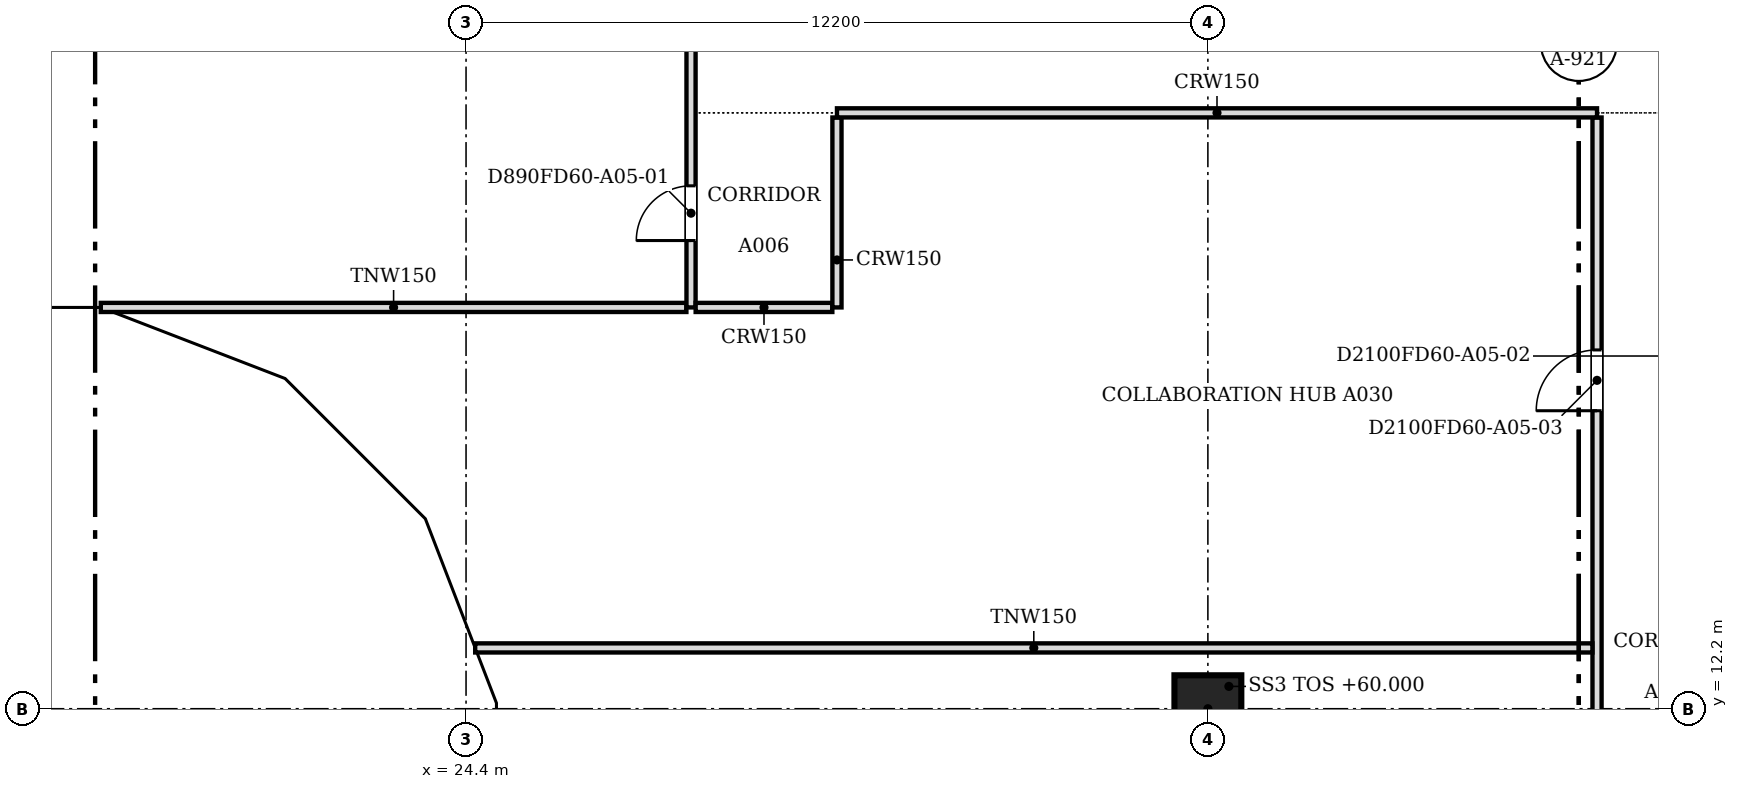
"""IFC4 building model, lengths in metres.
Left out: names, types, materials, properties, quantities, classifications, styles, units other than length and angle.
Written with IfcOpenShell. Run it as: python <this file> out.ifc"""

import sys

from ifc_helpers import new_model, si_unit, direction, frame, frame_2d, origin, origin_2d, place, context, subcontext, project, spatial, polyline, rectangle, outline, extrude, faceted_brep, source, transform, mapped, element, fill, save


model = new_model("IFC4")
c1 = context("Model", 3, precision=1e-05, world=origin(), true_north=direction((0.0, 1.0)))
c2 = subcontext(c1, "Body", "Model", "MODEL_VIEW")
j1 = project(units=[si_unit("LENGTHUNIT", "METRE"), si_unit("PLANEANGLEUNIT", "RADIAN")], contexts=[c1])
p1 = place(None, origin())
s1 = spatial("IfcSite", under=j1, at=p1, CompositionType="ELEMENT")
p2 = place(p1, origin())
s2 = spatial("IfcBuilding", under=s1, at=p2, CompositionType="ELEMENT")
p3 = place(p2, frame((0.0, 0.0, 60.0)))
s3 = spatial("IfcBuildingStorey", under=s2, at=p3, CompositionType="ELEMENT", Elevation=60.0)
p4 = place(p3, frame((36.6, 12.2, 0.0), z_axis=(0.0, 0.0, 1.0), x_axis=(1.0, 0.0, 0.0)))
e1 = element("IfcColumn", 1, at=p4, inside=s3, PredefinedType="COLUMN", context=c2, shape_type="SweptSolid", body=[
    extrude(rectangle(XDim=1.1, YDim=1.1, at=origin_2d()), origin(), (0.0, 0.0, 1.0), 3.5),
])
m1 = source(origin(), c2, "Body", "Brep", [
    faceted_brep([(3.05, -0.25, 0.0), (6.1, -0.25, 3.743), (6.1, -0.25, 3.857), (3.05, -0.25, 7.6), (0.0, -0.25, 3.8), (0.0, 0.25, 3.8), (3.05, 0.25, 7.6), (6.146, 0.25, 3.8), (3.05, 0.25, 0.0), (6.146, -0.0, 3.8)], [[[0, 1, 2, 3, 4]], [[5, 6, 7, 8]], [[8, 7, 9, 1, 0]], [[7, 6, 3, 2, 9]], [[6, 5, 4, 3]], [[5, 8, 0, 4]], [[1, 9, 2]]]),
])
p5 = place(p3, frame((12.2, 18.55, -3.8), z_axis=(0.0, 0.0, 1.0), x_axis=(1.0, 0.0, 0.0)))
e2 = element("IfcWall", 2, at=p5, inside=s3, PredefinedType="SOLIDWALL", context=c2, shape_type="MappedRepresentation", body=[
    mapped(m1, transform((0.0, 0.0, 0.0), scale=1.0)),
])
m2 = source(origin(), c2, "Body", "SweptSolid", [
    extrude(outline(polyline([(3.052, 0.398), (5.824, 3.8), (3.052, 7.202), (0.321, 3.8), (3.052, 0.398)])), frame((0.0, 0.26, 0.0), z_axis=(0.0, -1.0, 0.0), x_axis=(1.0, 0.0, 0.0)), (0.0, 0.0, 1.0), 0.52),
])
p6 = place(p5, origin())
e3 = element("IfcOpeningElement", 3, at=p6, cuts=e2, PredefinedType="OPENING", context=c2, shape_type="MappedRepresentation", body=[
    mapped(m2, transform((0.0, 0.0, 0.0), scale=1.0)),
])
m3 = source(origin(), c2, "Body", "Brep", [
    faceted_brep([(3.096, -0.25, 7.536), (0.047, -0.25, 3.856), (0.047, -0.25, 3.744), (3.096, -0.25, 0.064), (0.0, 0.25, 3.8), (3.149, 0.25, 7.6), (3.202, 0.25, 7.536), (3.202, 0.25, 0.064), (3.149, 0.25, 0.0), (3.149, -0.0, 0.0), (3.149, -0.0, 7.6), (0.0, 0.0, 3.8)], [[[0, 1, 2, 3]], [[4, 5, 6, 7, 8]], [[8, 7, 9]], [[6, 5, 10]], [[5, 4, 11, 1, 0, 10]], [[4, 8, 9, 3, 2, 11]], [[11, 2, 1]], [[3, 9, 7, 6, 10, 0]]]),
])
p7 = place(p3, frame((18.346, 18.55, -3.8), z_axis=(0.0, 0.0, 1.0), x_axis=(0.932985567668, -0.359913782069, 0.0)))
e4 = element("IfcWall", 4, at=p7, inside=s3, PredefinedType="SOLIDWALL", context=c2, shape_type="MappedRepresentation", body=[
    mapped(m3, transform((0.0, 0.0, 0.0), scale=1.0)),
])
m4 = source(origin(), c2, "Body", "SweptSolid", [
    extrude(outline(polyline([(2.949, 6.967), (0.325, 3.8), (2.949, 0.633), (2.949, 6.967)])), frame((0.0, 0.26, 0.0), z_axis=(0.0, -1.0, 0.0), x_axis=(1.0, 0.0, 0.0)), (0.0, 0.0, 1.0), 0.52),
])
p8 = place(p7, origin())
e5 = element("IfcOpeningElement", 5, at=p8, cuts=e4, PredefinedType="OPENING", context=c2, shape_type="MappedRepresentation", body=[
    mapped(m4, transform((0.0, 0.0, 0.0), scale=1.0)),
])
m5 = source(origin(), c2, "Body", "Brep", [
    faceted_brep([(0.106, -0.25, 0.064), (3.156, -0.25, 3.736), (3.156, -0.25, 3.864), (0.106, -0.25, 7.536), (0.0, 0.25, 7.536), (0.053, 0.25, 7.6), (3.209, 0.25, 3.8), (0.053, 0.25, 0.0), (0.0, 0.25, 0.064), (3.209, -0.0, 3.8), (0.053, 0.0, 0.0), (0.053, 0.0, 7.6)], [[[0, 1, 2, 3]], [[4, 5, 6, 7, 8]], [[7, 6, 9, 1, 0, 10]], [[6, 5, 11, 3, 2, 9]], [[5, 4, 11]], [[8, 7, 10]], [[8, 10, 0, 3, 11, 4]], [[1, 9, 2]]]),
])
p9 = place(p3, frame((21.248, 17.454, -3.8), z_axis=(0.0, 0.0, 1.0), x_axis=(0.707106781187, -0.707106781187, 0.0)))
e6 = element("IfcWall", 6, at=p9, inside=s3, PredefinedType="SOLIDWALL", context=c2, shape_type="MappedRepresentation", body=[
    mapped(m5, transform((0.0, 0.0, 0.0), scale=1.0)),
])
m6 = source(origin(), c2, "Body", "SweptSolid", [
    extrude(outline(polyline([(0.253, 0.632), (2.884, 3.8), (0.253, 6.968), (0.253, 0.632)])), frame((0.0, 0.26, 0.0), z_axis=(0.0, -1.0, 0.0), x_axis=(1.0, 0.0, 0.0)), (0.0, 0.0, 1.0), 0.52),
])
p10 = place(p9, origin())
e7 = element("IfcOpeningElement", 7, at=p10, cuts=e6, PredefinedType="OPENING", context=c2, shape_type="MappedRepresentation", body=[
    mapped(m6, transform((0.0, 0.0, 0.0), scale=1.0)),
])
m7 = source(origin(), c2, "Body", "Brep", [
    faceted_brep([(3.103, -0.25, 7.544), (0.053, -0.25, 3.864), (0.053, -0.25, 3.736), (3.103, -0.25, 0.056), (0.0, 0.25, 3.8), (3.149, 0.25, 7.6), (3.196, 0.25, 7.543), (3.196, 0.25, 0.057), (3.149, 0.25, 0.0), (3.149, -0.0, 0.0), (3.149, -0.0, 7.6), (0.0, 0.0, 3.8)], [[[0, 1, 2, 3]], [[4, 5, 6, 7, 8]], [[8, 7, 9]], [[6, 5, 10]], [[5, 4, 11, 1, 0, 10]], [[4, 8, 9, 3, 2, 11]], [[11, 2, 1]], [[3, 9, 7, 6, 10, 0]]]),
])
p11 = place(p3, frame((23.517, 15.185, -3.8), z_axis=(0.0, 0.0, 1.0), x_axis=(0.359864468756, -0.933004589553, 0.0)))
e8 = element("IfcWall", 8, at=p11, inside=s3, PredefinedType="SOLIDWALL", context=c2, shape_type="MappedRepresentation", body=[
    mapped(m7, transform((0.0, 0.0, 0.0), scale=1.0)),
])
p12 = place(p11, origin())
e9 = element("IfcOpeningElement", 9, at=p12, cuts=e8, PredefinedType="OPENING", context=c2, shape_type="MappedRepresentation", body=[
    mapped(m4, transform((0.0, 0.0, 0.0), scale=1.0)),
])
m8 = source(origin(), c2, "Body", "Brep", [
    faceted_brep([(0.093, -0.25, 0.057), (3.143, -0.25, 3.8), (0.093, -0.25, 7.543), (0.0, 0.25, 7.544), (0.047, 0.25, 7.6), (3.143, 0.25, 3.8), (0.047, 0.25, 0.0), (0.0, 0.25, 0.056), (0.047, 0.0, 0.0), (0.047, 0.0, 7.6)], [[[0, 1, 2]], [[3, 4, 5, 6, 7]], [[6, 5, 1, 0, 8]], [[5, 4, 9, 2, 1]], [[4, 3, 9]], [[7, 6, 8]], [[7, 8, 0, 2, 9, 3]]]),
])
p13 = place(p3, frame((24.65, 12.293, -3.8), z_axis=(0.0, 0.0, 1.0), x_axis=(0.0, -1.0, 0.0)))
e10 = element("IfcWall", 10, at=p13, inside=s3, PredefinedType="SOLIDWALL", context=c2, shape_type="MappedRepresentation", body=[
    mapped(m8, transform((0.0, 0.0, 0.0), scale=1.0)),
])
m9 = source(origin(), c2, "Body", "SweptSolid", [
    extrude(outline(polyline([(0.247, 0.641), (2.821, 3.8), (0.247, 6.959), (0.247, 0.641)])), frame((0.0, 0.26, 0.0), z_axis=(0.0, -1.0, 0.0), x_axis=(1.0, 0.0, 0.0)), (0.0, 0.0, 1.0), 0.52),
])
p14 = place(p13, origin())
e11 = element("IfcOpeningElement", 11, at=p14, cuts=e10, PredefinedType="OPENING", context=c2, shape_type="MappedRepresentation", body=[
    mapped(m9, transform((0.0, 0.0, 0.0), scale=1.0)),
])
m10 = source(origin(), c2, "Body", "Brep", [
    faceted_brep([(3.05, -0.25, 3.8), (0.0, -0.25, 3.8), (3.05, -0.25, 0.057), (0.0, 0.25, 3.8), (3.143, 0.25, 3.8), (3.143, 0.25, 0.056), (3.096, 0.25, 0.0), (3.096, -0.0, 0.0)], [[[0, 1, 2]], [[3, 4, 5, 6]], [[6, 5, 7]], [[4, 3, 1, 0]], [[3, 6, 7, 2, 1]], [[2, 7, 5, 4, 0]]]),
])
p15 = place(p3, frame((15.25, 18.55, 0.0), z_axis=(0.0, 0.0, 1.0), x_axis=(1.0, 0.0, 0.0)))
e12 = element("IfcWall", 12, at=p15, inside=s3, PredefinedType="SOLIDWALL", context=c2, shape_type="MappedRepresentation", body=[
    mapped(m10, transform((0.0, 0.0, 0.0), scale=1.0)),
])
m11 = source(origin(), c2, "Body", "SweptSolid", [
    extrude(outline(polyline([(2.896, 3.55), (0.526, 3.55), (2.896, 0.641), (2.896, 3.55)])), frame((0.0, 0.26, 0.0), z_axis=(0.0, -1.0, 0.0), x_axis=(1.0, 0.0, 0.0)), (0.0, 0.0, 1.0), 0.52),
])
p16 = place(p15, origin())
e13 = element("IfcOpeningElement", 13, at=p16, cuts=e12, PredefinedType="OPENING", context=c2, shape_type="MappedRepresentation", body=[
    mapped(m11, transform((0.0, 0.0, 0.0), scale=1.0)),
])
m12 = source(origin(), c2, "Body", "Brep", [
    faceted_brep([(0.093, -0.25, 0.056), (3.143, -0.25, 3.736), (3.143, -0.25, 3.8), (0.093, -0.25, 3.8), (0.0, 0.25, 3.8), (3.196, 0.25, 3.8), (0.047, 0.25, 0.0), (0.0, 0.25, 0.057), (3.196, -0.0, 3.8), (0.047, 0.0, 0.0)], [[[0, 1, 2, 3]], [[4, 5, 6, 7]], [[6, 5, 8, 1, 0, 9]], [[5, 4, 3, 2, 8]], [[7, 6, 9]], [[7, 9, 0, 3, 4]], [[1, 8, 2]]]),
])
p17 = place(p3, frame((18.303, 18.567, 0.0), z_axis=(0.0, 0.0, 1.0), x_axis=(0.932978940178, -0.359930961693, 0.0)))
e14 = element("IfcWall", 14, at=p17, inside=s3, PredefinedType="SOLIDWALL", context=c2, shape_type="MappedRepresentation", body=[
    mapped(m12, transform((0.0, 0.0, 0.0), scale=1.0)),
])
m13 = source(origin(), c2, "Body", "SweptSolid", [
    extrude(outline(polyline([(0.247, 0.633), (2.664, 3.55), (0.247, 3.55), (0.247, 0.633)])), frame((0.0, 0.26, 0.0), z_axis=(0.0, -1.0, 0.0), x_axis=(1.0, 0.0, 0.0)), (0.0, 0.0, 1.0), 0.52),
])
p18 = place(p17, origin())
e15 = element("IfcOpeningElement", 15, at=p18, cuts=e14, PredefinedType="OPENING", context=c2, shape_type="MappedRepresentation", body=[
    mapped(m13, transform((0.0, 0.0, 0.0), scale=1.0)),
])
m14 = source(origin(), c2, "Body", "Brep", [
    faceted_brep([(3.103, -0.25, 3.8), (0.053, -0.25, 3.8), (0.053, -0.25, 3.736), (3.103, -0.25, 0.064), (0.0, 0.25, 3.8), (3.209, 0.25, 3.8), (3.209, 0.25, 0.064), (3.156, 0.25, 0.0), (3.156, -0.0, 0.0), (0.0, 0.0, 3.8)], [[[0, 1, 2, 3]], [[4, 5, 6, 7]], [[7, 6, 8]], [[5, 4, 9, 1, 0]], [[4, 7, 8, 3, 2, 9]], [[2, 1, 9]], [[3, 8, 6, 5, 0]]]),
])
p19 = place(p3, frame((21.285, 17.417, 0.0), z_axis=(0.0, 0.0, 1.0), x_axis=(0.707106781187, -0.707106781187, 0.0)))
e16 = element("IfcWall", 16, at=p19, inside=s3, PredefinedType="SOLIDWALL", context=c2, shape_type="MappedRepresentation", body=[
    mapped(m14, transform((0.0, 0.0, 0.0), scale=1.0)),
])
m15 = source(origin(), c2, "Body", "SweptSolid", [
    extrude(outline(polyline([(2.956, 3.55), (0.533, 3.55), (2.956, 0.632), (2.956, 3.55)])), frame((0.0, 0.26, 0.0), z_axis=(0.0, -1.0, 0.0), x_axis=(1.0, 0.0, 0.0)), (0.0, 0.0, 1.0), 0.52),
])
p20 = place(p19, origin())
e17 = element("IfcOpeningElement", 17, at=p20, cuts=e16, PredefinedType="OPENING", context=c2, shape_type="MappedRepresentation", body=[
    mapped(m15, transform((0.0, 0.0, 0.0), scale=1.0)),
])
m16 = source(origin(), c2, "Body", "Brep", [
    faceted_brep([(0.106, -0.25, 0.064), (3.156, -0.25, 3.744), (3.156, -0.25, 3.8), (0.106, -0.25, 3.8), (0.0, 0.25, 3.8), (3.202, 0.25, 3.8), (0.053, 0.25, 0.0), (0.0, 0.25, 0.064), (3.202, -0.0, 3.8), (0.053, 0.0, 0.0)], [[[0, 1, 2, 3]], [[4, 5, 6, 7]], [[6, 5, 8, 1, 0, 9]], [[5, 4, 3, 2, 8]], [[7, 6, 9]], [[7, 9, 0, 3, 4]], [[1, 8, 2]]]),
])
p21 = place(p3, frame((23.497, 15.234, 0.0), z_axis=(0.0, 0.0, 1.0), x_axis=(0.359913782069, -0.932985567668, 0.0)))
e18 = element("IfcWall", 18, at=p21, inside=s3, PredefinedType="SOLIDWALL", context=c2, shape_type="MappedRepresentation", body=[
    mapped(m16, transform((0.0, 0.0, 0.0), scale=1.0)),
])
m17 = source(origin(), c2, "Body", "SweptSolid", [
    extrude(outline(polyline([(0.253, 0.633), (2.671, 3.55), (0.253, 3.55), (0.253, 0.633)])), frame((0.0, 0.26, 0.0), z_axis=(0.0, -1.0, 0.0), x_axis=(1.0, 0.0, 0.0)), (0.0, 0.0, 1.0), 0.52),
])
p22 = place(p21, origin())
e19 = element("IfcOpeningElement", 19, at=p22, cuts=e18, PredefinedType="OPENING", context=c2, shape_type="MappedRepresentation", body=[
    mapped(m17, transform((0.0, 0.0, 0.0), scale=1.0)),
])
m18 = source(origin(), c2, "Body", "Brep", [
    faceted_brep([(3.096, -0.25, 0.0), (6.1, -0.25, 3.8), (0.047, -0.25, 3.8), (0.047, -0.25, 3.743), (0.0, 0.25, 3.8), (6.053, 0.25, 3.8), (6.053, 0.25, 3.741), (3.096, 0.25, 0.0), (6.1, -0.0, 3.8), (0.0, 0.0, 3.8)], [[[0, 1, 2, 3]], [[4, 5, 6, 7]], [[7, 6, 8, 1, 0]], [[5, 4, 9, 2, 1, 8]], [[4, 7, 0, 3, 9]], [[3, 2, 9]], [[6, 5, 8]]]),
])
p23 = place(p3, frame((24.65, 12.247, 0.0), z_axis=(0.0, 0.0, 1.0), x_axis=(0.0, -1.0, 0.0)))
e20 = element("IfcWall", 20, at=p23, inside=s3, PredefinedType="SOLIDWALL", context=c2, shape_type="MappedRepresentation", body=[
    mapped(m18, transform((0.0, 0.0, 0.0), scale=1.0)),
])
m19 = source(origin(), c2, "Body", "SweptSolid", [
    extrude(outline(polyline([(3.094, 0.399), (5.584, 3.55), (0.526, 3.55), (3.094, 0.399)])), frame((0.0, 0.26, 0.0), z_axis=(0.0, -1.0, 0.0), x_axis=(1.0, 0.0, 0.0)), (0.0, 0.0, 1.0), 0.52),
])
p24 = place(p23, origin())
e21 = element("IfcOpeningElement", 21, at=p24, cuts=e20, PredefinedType="OPENING", context=c2, shape_type="MappedRepresentation", body=[
    mapped(m19, transform((0.0, 0.0, 0.0), scale=1.0)),
])
p25 = place(p3, frame((43.0, 0.5, 0.0), z_axis=(0.0, 0.0, 1.0), x_axis=(0.0, 1.0, 0.0)))
e22 = element("IfcWall", 22, at=p25, inside=s3, PredefinedType="PARTITIONING", context=c2, shape_type="SweptSolid", body=[
    extrude(rectangle(XDim=21.424, YDim=0.15, at=frame_2d((10.712, 0.0))), origin(), (0.0, 0.0, 1.0), 2.888),
])
m20 = source(origin(), c2, "Body", "SweptSolid", [
    extrude(rectangle(XDim=1.0, YDim=2.1, at=frame_2d((0.5, 1.05))), frame((0.0, 0.085, 0.0), z_axis=(0.0, -1.0, 0.0), x_axis=(1.0, 0.0, 0.0)), (0.0, 0.0, 1.0), 0.17),
])
p26 = place(p25, frame((16.601, 0.0, 0.0)))
e23 = element("IfcOpeningElement", 23, at=p26, cuts=e22, PredefinedType="OPENING", context=c2, shape_type="MappedRepresentation", body=[
    mapped(m20, transform((0.0, 0.0, 0.0), scale=1.0)),
])
p27 = place(p25, frame((7.7, 0.0, 0.0)))
e24 = element("IfcOpeningElement", 24, at=p27, cuts=e22, PredefinedType="OPENING", context=c2, shape_type="MappedRepresentation", body=[
    mapped(m20, transform((0.0, 0.0, 0.0), scale=1.0)),
])
p28 = place(p3, frame((24.55, 13.2, 0.0), z_axis=(0.0, 0.0, 1.0), x_axis=(1.0, 0.0, 0.0)))
e25 = element("IfcWall", 25, at=p28, inside=s3, PredefinedType="PARTITIONING", context=c2, shape_type="SweptSolid", body=[
    extrude(rectangle(XDim=18.374, YDim=0.15, at=frame_2d((9.187, 0.0))), origin(), (0.0, 0.0, 1.0), 2.888),
])
p29 = place(p3, frame((18.393, 18.8, 0.0), z_axis=(0.0, 0.0, 1.0), x_axis=(1.0, 0.0, 0.0)))
e26 = element("IfcWall", 26, at=p29, inside=s3, PredefinedType="PARTITIONING", context=c2, shape_type="SweptSolid", body=[
    extrude(rectangle(XDim=9.631, YDim=0.15, at=frame_2d((4.815, 0.0))), origin(), (0.0, 0.0, 1.0), 2.888),
])
p30 = place(p3, frame((28.1, 18.8, 0.0), z_axis=(0.0, 0.0, 1.0), x_axis=(0.0, 1.0, 0.0)))
e27 = element("IfcWall", 27, at=p30, inside=s3, PredefinedType="PARTITIONING", context=c2, shape_type="SweptSolid", body=[
    extrude(rectangle(XDim=26.5, YDim=0.15, at=frame_2d((13.25, 0.0))), origin(), (0.0, 0.0, 1.0), 2.888),
])
m21 = source(origin(), c2, "Body", "SweptSolid", [
    extrude(rectangle(XDim=0.9, YDim=2.1, at=frame_2d((0.45, 1.05))), frame((0.0, 0.085, 0.0), z_axis=(0.0, -1.0, 0.0), x_axis=(1.0, 0.0, 0.0)), (0.0, 0.0, 1.0), 0.17),
])
p31 = place(p30, frame((1.1, 0.0, 0.0)))
e28 = element("IfcOpeningElement", 28, at=p31, cuts=e27, PredefinedType="OPENING", context=c2, shape_type="MappedRepresentation", body=[
    mapped(m21, transform((0.0, 0.0, 0.0), scale=1.0)),
])
p32 = place(p30, frame((23.151, 0.0, 0.0)))
e29 = element("IfcOpeningElement", 29, at=p32, cuts=e27, PredefinedType="OPENING", context=c2, shape_type="MappedRepresentation", body=[
    mapped(m20, transform((0.0, 0.0, 0.0), scale=1.0)),
])
p33 = place(p30, frame((8.2, 0.0, 0.0)))
e30 = element("IfcOpeningElement", 30, at=p33, cuts=e27, PredefinedType="OPENING", context=c2, shape_type="MappedRepresentation", body=[
    mapped(m21, transform((0.0, 0.0, 0.0), scale=1.0)),
])
p34 = place(p30, frame((15.8, 0.0, 0.0)))
e31 = element("IfcOpeningElement", 31, at=p34, cuts=e27, PredefinedType="OPENING", context=c2, shape_type="MappedRepresentation", body=[
    mapped(m21, transform((0.0, 0.0, 0.0), scale=1.0)),
])
p35 = place(p3, frame((28.176, 18.8, 0.0), z_axis=(0.0, 0.0, 1.0), x_axis=(1.0, 0.0, 0.0)))
e32 = element("IfcWall", 32, at=p35, inside=s3, PredefinedType="PARTITIONING", context=c2, shape_type="SweptSolid", body=[
    extrude(rectangle(XDim=2.248, YDim=0.15, at=frame_2d((1.124, 0.0))), origin(), (0.0, 0.0, 1.0), 2.888),
])
p36 = place(p3, frame((30.5, 18.8, 0.0), z_axis=(0.0, 0.0, 1.0), x_axis=(0.0, 1.0, 0.0)))
e33 = element("IfcWall", 33, at=p36, inside=s3, PredefinedType="PARTITIONING", context=c2, shape_type="SweptSolid", body=[
    extrude(rectangle(XDim=3.124, YDim=0.15, at=frame_2d((1.562, 0.0))), origin(), (0.0, 0.0, 1.0), 2.888),
])
p37 = place(p3, frame((30.5, 22.0, 0.0), z_axis=(0.0, 0.0, 1.0), x_axis=(1.0, 0.0, 0.0)))
e34 = element("IfcWall", 34, at=p37, inside=s3, PredefinedType="PARTITIONING", context=c2, shape_type="SweptSolid", body=[
    extrude(rectangle(XDim=12.5, YDim=0.15, at=frame_2d((6.25, 0.0))), origin(), (0.0, 0.0, 1.0), 2.888),
])
m22 = source(origin(), c2, "Body", "SweptSolid", [
    extrude(rectangle(XDim=0.9, YDim=2.1, at=frame_2d((0.45, 1.05))), frame((0.0, 0.025, 0.0), z_axis=(0.0, -1.0, 0.0), x_axis=(1.0, 0.0, 0.0)), (0.0, 0.0, 1.0), 0.05),
])
p38 = place(p31, origin())
e35 = element("IfcDoor", 35, at=p38, inside=s3, OperationType="SINGLE_SWING_LEFT", PredefinedType="DOOR", context=c2, shape_type="MappedRepresentation", body=[
    mapped(m22, transform((0.0, 0.0, 0.0), scale=1.0)),
])
fill(e28, e35)
m23 = source(origin(), c2, "Body", "SweptSolid", [
    extrude(rectangle(XDim=1.0, YDim=2.1, at=frame_2d((0.5, 1.05))), frame((0.0, 0.025, 0.0), z_axis=(0.0, -1.0, 0.0), x_axis=(1.0, 0.0, 0.0)), (0.0, 0.0, 1.0), 0.05),
])
p39 = place(p26, origin())
e36 = element("IfcDoor", 36, at=p39, inside=s3, OperationType="SINGLE_SWING_LEFT", PredefinedType="DOOR", context=c2, shape_type="MappedRepresentation", body=[
    mapped(m23, transform((0.0, 0.0, 0.0), scale=1.0)),
])
fill(e23, e36)
save(model, sys.argv[1])
